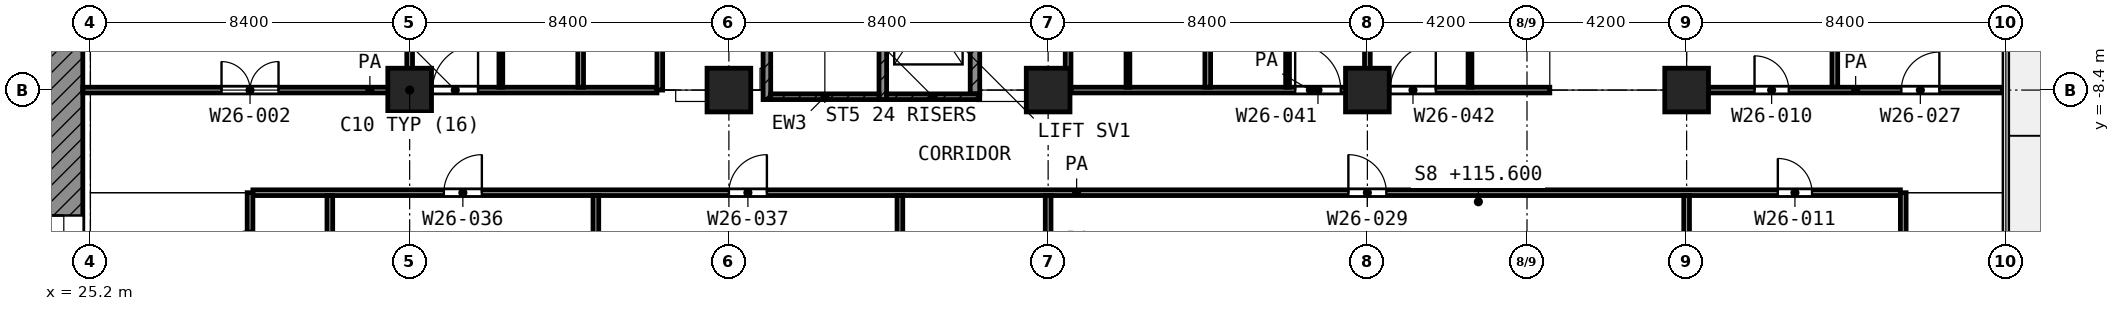
"""IFC4 building model, lengths in metres.
Left out: names, types, materials, properties, quantities, classifications, styles, units other than length and angle.
Written with IfcOpenShell. Run it as: python <this file> out.ifc"""

import sys

from ifc_helpers import new_model, si_unit, direction, frame, frame_2d, origin, origin_2d, place, context, subcontext, project, spatial, rectangle, extrude, element, fill, save


model = new_model("IFC4")
c1 = context("Model", 3, precision=1e-05, world=origin(), true_north=direction((0.0, 1.0)))
c2 = subcontext(c1, "Body", "Model", "MODEL_VIEW")
j1 = project(units=[si_unit("LENGTHUNIT", "METRE"), si_unit("PLANEANGLEUNIT", "RADIAN")], contexts=[c1])
p1 = place(None, origin())
s1 = spatial("IfcSite", under=j1, at=p1, CompositionType="ELEMENT")
p2 = place(p1, origin())
s2 = spatial("IfcBuilding", under=s1, at=p2, CompositionType="ELEMENT")
p3 = place(p2, frame((0.0, 0.0, 115.6)))
s3 = spatial("IfcBuildingStorey", under=s2, at=p3, CompositionType="ELEMENT", Elevation=115.6)
for number, where, z_axis, x_axis in (
    (1, (33.6, -8.4, 0.0), (0.0, 0.0, 1.0), (1.0, 0.0, 0.0)),
    (2, (42.0, -8.4, 0.0), (0.0, 0.0, 1.0), (1.0, 0.0, 0.0)),
    (3, (50.4, -8.4, 0.0), (0.0, 0.0, 1.0), (1.0, 0.0, 0.0)),
    (4, (58.8, -8.4, 0.0), (0.0, 0.0, 1.0), (1.0, 0.0, 0.0)),
    (5, (67.2, -8.4, 0.0), (0.0, 0.0, 1.0), (1.0, 0.0, 0.0)),
):
    element("IfcColumn", number, at=place(p3, frame(where, z_axis=z_axis, x_axis=x_axis)), inside=s3, PredefinedType="COLUMN", context=c2, shape_type="SweptSolid", body=[
        extrude(rectangle(XDim=1.15, YDim=1.15, at=origin_2d()), origin(), (0.0, 0.0, 1.0), 4.2),
    ])
p4 = place(p3, frame((24.5, -24.0, 0.0), z_axis=(0.0, 0.0, 1.0), x_axis=(0.0, 1.0, 0.0)))
e6 = element("IfcWall", 6, at=p4, inside=s3, PredefinedType="SHEAR", context=c2, shape_type="SweptSolid", body=[
    extrude(rectangle(XDim=18.6, YDim=1.0, at=frame_2d((9.3, 0.0))), origin(), (0.0, 0.0, 1.0), 3.6),
])
p5 = place(p4, frame((10.5, 0.0, 0.0)))
e7 = element("IfcOpeningElement", 7, at=p5, cuts=e6, PredefinedType="OPENING", context=c2, shape_type="SweptSolid", body=[
    extrude(rectangle(XDim=1.8, YDim=2.1, at=frame_2d((0.9, 1.05))), frame((0.0, 0.51, 0.0), z_axis=(0.0, -1.0, 0.0), x_axis=(1.0, 0.0, 0.0)), (0.0, 0.0, 1.0), 1.02),
])
p6 = place(p3, frame((43.0, -8.65, 0.0), z_axis=(0.0, 0.0, 1.0), x_axis=(0.0, 1.0, 0.0)))
e8 = element("IfcWall", 8, at=p6, inside=s3, PredefinedType="SHEAR", context=c2, shape_type="SweptSolid", body=[
    extrude(rectangle(XDim=8.35, YDim=0.2, at=frame_2d((4.175, 0.0))), origin(), (0.0, 0.0, 1.0), 3.6),
])
p7 = place(p6, frame((7.0, 0.0, 0.0)))
e9 = element("IfcOpeningElement", 9, at=p7, cuts=e8, PredefinedType="OPENING", context=c2, shape_type="SweptSolid", body=[
    extrude(rectangle(XDim=1.1, YDim=2.1, at=frame_2d((0.55, 1.05))), frame((0.0, 0.11, 0.0), z_axis=(0.0, -1.0, 0.0), x_axis=(1.0, 0.0, 0.0)), (0.0, 0.0, 1.0), 0.22),
])
p8 = place(p3, frame((46.05, -8.65, 0.0), z_axis=(0.0, 0.0, 1.0), x_axis=(0.0, 1.0, 0.0)))
e10 = element("IfcWall", 10, at=p8, inside=s3, PredefinedType="SHEAR", context=c2, shape_type="SweptSolid", body=[
    extrude(rectangle(XDim=8.35, YDim=0.2, at=frame_2d((4.175, 0.0))), origin(), (0.0, 0.0, 1.0), 3.6),
])
p9 = place(p8, frame((7.0, 0.0, 0.0)))
e11 = element("IfcOpeningElement", 11, at=p9, cuts=e10, PredefinedType="OPENING", context=c2, shape_type="SweptSolid", body=[
    extrude(rectangle(XDim=1.1, YDim=2.1, at=frame_2d((0.55, 1.05))), frame((0.0, 0.11, 0.0), z_axis=(0.0, -1.0, 0.0), x_axis=(1.0, 0.0, 0.0)), (0.0, 0.0, 1.0), 0.22),
])
p10 = place(p3, frame((43.1, -8.575, 0.0), z_axis=(0.0, 0.0, 1.0), x_axis=(1.0, 0.0, 0.0)))
e12 = element("IfcWall", 12, at=p10, inside=s3, PredefinedType="SHEAR", context=c2, shape_type="SweptSolid", body=[
    extrude(rectangle(XDim=2.85, YDim=0.15, at=frame_2d((1.425, 0.0))), origin(), (0.0, 0.0, 1.0), 3.6),
])
p11 = place(p3, frame((46.15, -8.575, 0.0), z_axis=(0.0, 0.0, 1.0), x_axis=(1.0, 0.0, 0.0)))
e13 = element("IfcWall", 13, at=p11, inside=s3, PredefinedType="SHEAR", context=c2, shape_type="SweptSolid", body=[
    extrude(rectangle(XDim=2.45, YDim=0.15, at=frame_2d((1.225, 0.0))), origin(), (0.0, 0.0, 1.0), 3.6),
])
p12 = place(p3, frame((48.475, -8.5, 0.0), z_axis=(0.0, 0.0, 1.0), x_axis=(0.0, 1.0, 0.0)))
e14 = element("IfcWall", 14, at=p12, inside=s3, PredefinedType="SHEAR", context=c2, shape_type="SweptSolid", body=[
    extrude(rectangle(XDim=3.475, YDim=0.25, at=frame_2d((1.738, 0.0))), origin(), (0.0, 0.0, 1.0), 3.6),
])
p13 = place(p3, frame((36.0, -8.325, 0.0), z_axis=(0.0, 0.0, 1.0), x_axis=(0.0, 1.0, 0.0)))
e15 = element("IfcWall", 15, at=p13, inside=s3, PredefinedType="PARTITIONING", context=c2, shape_type="SweptSolid", body=[
    extrude(rectangle(XDim=2.624, YDim=0.1, at=frame_2d((1.312, 0.0))), origin(), (0.0, 0.0, 1.0), 3.6),
])
for number, where, z_axis, x_axis in (
    (16, (52.5, -8.325, 0.0), (0.0, 0.0, 1.0), (0.0, 1.0, 0.0)),
    (17, (56.7, -8.325, 0.0), (0.0, 0.0, 1.0), (0.0, 1.0, 0.0)),
    (18, (61.5, -8.325, 0.0), (0.0, 0.0, 1.0), (0.0, 1.0, 0.0)),
):
    element("IfcWall", number, at=place(p3, frame(where, z_axis=z_axis, x_axis=x_axis)), inside=s3, PredefinedType="PARTITIONING", context=c2, shape_type="SweptSolid", body=[
        extrude(rectangle(XDim=2.625, YDim=0.1, at=frame_2d((1.312, 0.0))), origin(), (0.0, 0.0, 1.0), 3.6),
    ])
p14 = place(p3, frame((29.475, -11.1, 0.0), z_axis=(0.0, 0.0, 1.0), x_axis=(1.0, 0.0, 0.0)))
e19 = element("IfcWall", 19, at=p14, inside=s3, PredefinedType="PARTITIONING", context=c2, shape_type="SweptSolid", body=[
    extrude(rectangle(XDim=43.35, YDim=0.15, at=frame_2d((21.675, 0.0))), origin(), (0.0, 0.0, 1.0), 3.6),
])
p15 = place(p14, frame((28.825, 0.0, 0.0)))
e20 = element("IfcOpeningElement", 20, at=p15, cuts=e19, PredefinedType="OPENING", context=c2, shape_type="SweptSolid", body=[
    extrude(rectangle(XDim=1.0, YDim=2.1, at=frame_2d((0.5, 1.05))), frame((0.0, 0.085, 0.0), z_axis=(0.0, -1.0, 0.0), x_axis=(1.0, 0.0, 0.0)), (0.0, 0.0, 1.0), 0.17),
])
p16 = place(p14, frame((40.125, 0.0, 0.0)))
e21 = element("IfcOpeningElement", 21, at=p16, cuts=e19, PredefinedType="OPENING", context=c2, shape_type="SweptSolid", body=[
    extrude(rectangle(XDim=0.9, YDim=2.1, at=frame_2d((0.45, 1.05))), frame((0.0, 0.085, 0.0), z_axis=(0.0, -1.0, 0.0), x_axis=(1.0, 0.0, 0.0)), (0.0, 0.0, 1.0), 0.17),
])
p17 = place(p14, frame((5.025, 0.0, 0.0)))
e22 = element("IfcOpeningElement", 22, at=p17, cuts=e19, PredefinedType="OPENING", context=c2, shape_type="SweptSolid", body=[
    extrude(rectangle(XDim=1.0, YDim=2.1, at=frame_2d((0.5, 1.05))), frame((0.0, 0.085, 0.0), z_axis=(0.0, -1.0, 0.0), x_axis=(1.0, 0.0, 0.0)), (0.0, 0.0, 1.0), 0.17),
])
p18 = place(p14, frame((12.525, 0.0, 0.0)))
e23 = element("IfcOpeningElement", 23, at=p18, cuts=e19, PredefinedType="OPENING", context=c2, shape_type="SweptSolid", body=[
    extrude(rectangle(XDim=1.0, YDim=2.1, at=frame_2d((0.5, 1.05))), frame((0.0, 0.085, 0.0), z_axis=(0.0, -1.0, 0.0), x_axis=(1.0, 0.0, 0.0)), (0.0, 0.0, 1.0), 0.17),
])
p19 = place(p3, frame((25.0, -8.4, 0.0), z_axis=(0.0, 0.0, 1.0), x_axis=(1.0, 0.0, 0.0)))
e24 = element("IfcWall", 24, at=p19, inside=s3, PredefinedType="PARTITIONING", context=c2, shape_type="SweptSolid", body=[
    extrude(rectangle(XDim=15.107, YDim=0.15, at=frame_2d((7.553, 0.0))), origin(), (0.0, 0.0, 1.0), 3.6),
])
p20 = place(p19, frame((3.65, 0.0, 0.0)))
e25 = element("IfcOpeningElement", 25, at=p20, cuts=e24, PredefinedType="OPENING", context=c2, shape_type="SweptSolid", body=[
    extrude(rectangle(XDim=1.5, YDim=2.1, at=frame_2d((0.75, 1.05))), frame((0.0, 0.085, 0.0), z_axis=(0.0, -1.0, 0.0), x_axis=(1.0, 0.0, 0.0)), (0.0, 0.0, 1.0), 0.17),
])
p21 = place(p19, frame((9.2, 0.0, 0.0)))
e26 = element("IfcOpeningElement", 26, at=p21, cuts=e24, PredefinedType="OPENING", context=c2, shape_type="SweptSolid", body=[
    extrude(rectangle(XDim=1.2, YDim=2.1, at=frame_2d((0.6, 1.05))), frame((0.0, 0.085, 0.0), z_axis=(0.0, -1.0, 0.0), x_axis=(1.0, 0.0, 0.0)), (0.0, 0.0, 1.0), 0.17),
])
p22 = place(p3, frame((51.0, -8.4, 0.0), z_axis=(0.0, 0.0, 1.0), x_axis=(1.0, 0.0, 0.0)))
e27 = element("IfcWall", 27, at=p22, inside=s3, PredefinedType="PARTITIONING", context=c2, shape_type="SweptSolid", body=[
    extrude(rectangle(XDim=12.6, YDim=0.15, at=frame_2d((6.3, 0.0))), origin(), (0.0, 0.0, 1.0), 3.6),
])
p23 = place(p22, frame((5.9, 0.0, 0.0)))
e28 = element("IfcOpeningElement", 28, at=p23, cuts=e27, PredefinedType="OPENING", context=c2, shape_type="SweptSolid", body=[
    extrude(rectangle(XDim=1.2, YDim=2.1, at=frame_2d((0.6, 1.05))), frame((0.0, 0.085, 0.0), z_axis=(0.0, -1.0, 0.0), x_axis=(1.0, 0.0, 0.0)), (0.0, 0.0, 1.0), 0.17),
])
p24 = place(p22, frame((8.4, 0.0, 0.0)))
e29 = element("IfcOpeningElement", 29, at=p24, cuts=e27, PredefinedType="OPENING", context=c2, shape_type="SweptSolid", body=[
    extrude(rectangle(XDim=1.2, YDim=2.1, at=frame_2d((0.6, 1.05))), frame((0.0, 0.085, 0.0), z_axis=(0.0, -1.0, 0.0), x_axis=(1.0, 0.0, 0.0)), (0.0, 0.0, 1.0), 0.17),
])
p25 = place(p3, frame((67.775, -8.4, 0.0), z_axis=(0.0, 0.0, 1.0), x_axis=(1.0, 0.0, 0.0)))
e30 = element("IfcWall", 30, at=p25, inside=s3, PredefinedType="PARTITIONING", context=c2, shape_type="SweptSolid", body=[
    extrude(rectangle(XDim=7.745, YDim=0.15, at=frame_2d((3.873, 0.0))), origin(), (0.0, 0.0, 1.0), 3.6),
])
p26 = place(p25, frame((1.212, 0.0, 0.0)))
e31 = element("IfcOpeningElement", 31, at=p26, cuts=e30, PredefinedType="OPENING", context=c2, shape_type="SweptSolid", body=[
    extrude(rectangle(XDim=0.9, YDim=2.1, at=frame_2d((0.45, 1.05))), frame((0.0, 0.085, 0.0), z_axis=(0.0, -1.0, 0.0), x_axis=(1.0, 0.0, 0.0)), (0.0, 0.0, 1.0), 0.17),
])
p27 = place(p25, frame((5.075, 0.0, 0.0)))
e32 = element("IfcOpeningElement", 32, at=p27, cuts=e30, PredefinedType="OPENING", context=c2, shape_type="SweptSolid", body=[
    extrude(rectangle(XDim=1.0, YDim=2.1, at=frame_2d((0.5, 1.05))), frame((0.0, 0.085, 0.0), z_axis=(0.0, -1.0, 0.0), x_axis=(1.0, 0.0, 0.0)), (0.0, 0.0, 1.0), 0.17),
])
p28 = place(p3, frame((29.4, -14.1, 0.0), z_axis=(0.0, 0.0, 1.0), x_axis=(0.0, 1.0, 0.0)))
e33 = element("IfcWall", 33, at=p28, inside=s3, PredefinedType="PARTITIONING", context=c2, shape_type="SweptSolid", body=[
    extrude(rectangle(XDim=3.0, YDim=0.15, at=frame_2d((1.5, 0.0))), origin(), (0.0, 0.0, 1.0), 3.6),
])
p29 = place(p28, frame((1.0, 0.0, 0.0)))
e34 = element("IfcOpeningElement", 34, at=p29, cuts=e33, PredefinedType="OPENING", context=c2, shape_type="SweptSolid", body=[
    extrude(rectangle(XDim=1.0, YDim=2.1, at=frame_2d((0.5, 1.05))), frame((0.0, 0.085, 0.0), z_axis=(0.0, -1.0, 0.0), x_axis=(1.0, 0.0, 0.0)), (0.0, 0.0, 1.0), 0.17),
])
p30 = place(p3, frame((31.5, -14.025, 0.0), z_axis=(0.0, 0.0, 1.0), x_axis=(0.0, 1.0, 0.0)))
e35 = element("IfcWall", 35, at=p30, inside=s3, PredefinedType="PARTITIONING", context=c2, shape_type="SweptSolid", body=[
    extrude(rectangle(XDim=2.85, YDim=0.15, at=frame_2d((1.425, 0.0))), origin(), (0.0, 0.0, 1.0), 3.6),
])
for number, where, z_axis, x_axis in (
    (36, (33.6, -8.325, 0.0), (0.0, 0.0, 1.0), (0.0, 1.0, 0.0)),
    (37, (38.1, -8.325, 0.0), (0.0, 0.0, 1.0), (0.0, 1.0, 0.0)),
):
    element("IfcWall", number, at=place(p3, frame(where, z_axis=z_axis, x_axis=x_axis)), inside=s3, PredefinedType="PARTITIONING", context=c2, shape_type="SweptSolid", body=[
        extrude(rectangle(XDim=8.322, YDim=0.15, at=frame_2d((4.161, 0.0))), origin(), (0.0, 0.0, 1.0), 3.6),
    ])
p31 = place(p3, frame((38.5, -14.025, 0.0), z_axis=(0.0, 0.0, 1.0), x_axis=(0.0, 1.0, 0.0)))
e38 = element("IfcWall", 38, at=p31, inside=s3, PredefinedType="PARTITIONING", context=c2, shape_type="SweptSolid", body=[
    extrude(rectangle(XDim=2.85, YDim=0.15, at=frame_2d((1.425, 0.0))), origin(), (0.0, 0.0, 1.0), 3.6),
])
p32 = place(p3, frame((40.182, -8.4, 0.0), z_axis=(0.0, 0.0, 1.0), x_axis=(0.0, 1.0, 0.0)))
e39 = element("IfcWall", 39, at=p32, inside=s3, PredefinedType="PARTITIONING", context=c2, shape_type="SweptSolid", body=[
    extrude(rectangle(XDim=8.05, YDim=0.15, at=frame_2d((4.025, 0.0))), origin(), (0.0, 0.0, 1.0), 3.6),
])
p33 = place(p32, frame((3.575, 0.0, 0.0)))
e40 = element("IfcOpeningElement", 40, at=p33, cuts=e39, PredefinedType="OPENING", context=c2, shape_type="SweptSolid", body=[
    extrude(rectangle(XDim=0.9, YDim=2.1, at=frame_2d((0.45, 1.05))), frame((0.0, 0.085, 0.0), z_axis=(0.0, -1.0, 0.0), x_axis=(1.0, 0.0, 0.0)), (0.0, 0.0, 1.0), 0.17),
])
for number, where, z_axis, x_axis in (
    (41, (46.5, -14.025, 0.0), (0.0, 0.0, 1.0), (0.0, 1.0, 0.0)),
    (42, (50.4, -14.025, 0.0), (0.0, 0.0, 1.0), (0.0, 1.0, 0.0)),
):
    element("IfcWall", number, at=place(p3, frame(where, z_axis=z_axis, x_axis=x_axis)), inside=s3, PredefinedType="PARTITIONING", context=c2, shape_type="SweptSolid", body=[
        extrude(rectangle(XDim=2.85, YDim=0.15, at=frame_2d((1.425, 0.0))), origin(), (0.0, 0.0, 1.0), 3.6),
    ])
p34 = place(p3, frame((50.925, -8.4, 0.0), z_axis=(0.0, 0.0, 1.0), x_axis=(0.0, 1.0, 0.0)))
e43 = element("IfcWall", 43, at=p34, inside=s3, PredefinedType="PARTITIONING", context=c2, shape_type="SweptSolid", body=[
    extrude(rectangle(XDim=6.548, YDim=0.15, at=frame_2d((3.274, 0.0))), origin(), (0.0, 0.0, 1.0), 3.6),
])
p35 = place(p34, frame((3.765, 0.0, 0.0)))
e44 = element("IfcOpeningElement", 44, at=p35, cuts=e43, PredefinedType="OPENING", context=c2, shape_type="SweptSolid", body=[
    extrude(rectangle(XDim=1.2, YDim=2.1, at=frame_2d((0.6, 1.05))), frame((0.0, 0.085, 0.0), z_axis=(0.0, -1.0, 0.0), x_axis=(1.0, 0.0, 0.0)), (0.0, 0.0, 1.0), 0.17),
])
p36 = place(p34, frame((1.583, 0.0, 0.0)))
e45 = element("IfcOpeningElement", 45, at=p36, cuts=e43, PredefinedType="OPENING", context=c2, shape_type="SweptSolid", body=[
    extrude(rectangle(XDim=1.2, YDim=2.1, at=frame_2d((0.6, 1.05))), frame((0.0, 0.085, 0.0), z_axis=(0.0, -1.0, 0.0), x_axis=(1.0, 0.0, 0.0)), (0.0, 0.0, 1.0), 0.17),
])
p37 = place(p3, frame((54.6, -8.325, 0.0), z_axis=(0.0, 0.0, 1.0), x_axis=(0.0, 1.0, 0.0)))
e46 = element("IfcWall", 46, at=p37, inside=s3, PredefinedType="PARTITIONING", context=c2, shape_type="SweptSolid", body=[
    extrude(rectangle(XDim=8.323, YDim=0.15, at=frame_2d((4.162, 0.0))), origin(), (0.0, 0.0, 1.0), 3.6),
])
p38 = place(p3, frame((58.8, -8.325, 0.0), z_axis=(0.0, 0.0, 1.0), x_axis=(0.0, 1.0, 0.0)))
e47 = element("IfcWall", 47, at=p38, inside=s3, PredefinedType="PARTITIONING", context=c2, shape_type="SweptSolid", body=[
    extrude(rectangle(XDim=8.325, YDim=0.15, at=frame_2d((4.163, 0.0))), origin(), (0.0, 0.0, 1.0), 3.6),
])
p39 = place(p3, frame((67.2, -14.025, 0.0), z_axis=(0.0, 0.0, 1.0), x_axis=(0.0, 1.0, 0.0)))
e48 = element("IfcWall", 48, at=p39, inside=s3, PredefinedType="PARTITIONING", context=c2, shape_type="SweptSolid", body=[
    extrude(rectangle(XDim=2.85, YDim=0.15, at=frame_2d((1.425, 0.0))), origin(), (0.0, 0.0, 1.0), 3.6),
])
p40 = place(p3, frame((71.1, -8.325, 0.0), z_axis=(0.0, 0.0, 1.0), x_axis=(0.0, 1.0, 0.0)))
e49 = element("IfcWall", 49, at=p40, inside=s3, PredefinedType="PARTITIONING", context=c2, shape_type="SweptSolid", body=[
    extrude(rectangle(XDim=8.325, YDim=0.15, at=frame_2d((4.163, 0.0))), origin(), (0.0, 0.0, 1.0), 3.6),
])
p41 = place(p3, frame((72.9, -14.1, 0.0), z_axis=(0.0, 0.0, 1.0), x_axis=(0.0, 1.0, 0.0)))
e50 = element("IfcWall", 50, at=p41, inside=s3, PredefinedType="PARTITIONING", context=c2, shape_type="SweptSolid", body=[
    extrude(rectangle(XDim=3.0, YDim=0.15, at=frame_2d((1.5, 0.0))), origin(), (0.0, 0.0, 1.0), 3.6),
])
p42 = place(p5, origin())
e51 = element("IfcDoor", 51, at=p42, inside=s3, OperationType="DOUBLE_DOOR_SINGLE_SWING", PredefinedType="DOOR", context=c2, shape_type="SweptSolid", body=[
    extrude(rectangle(XDim=1.8, YDim=2.1, at=frame_2d((0.9, 1.05))), frame((0.0, 0.025, 0.0), z_axis=(0.0, -1.0, 0.0), x_axis=(1.0, 0.0, 0.0)), (0.0, 0.0, 1.0), 0.05),
])
fill(e7, e51)
p43 = place(p20, origin())
e52 = element("IfcDoor", 52, at=p43, inside=s3, OperationType="DOUBLE_DOOR_SINGLE_SWING", PredefinedType="DOOR", context=c2, shape_type="SweptSolid", body=[
    extrude(rectangle(XDim=1.5, YDim=2.1, at=frame_2d((0.75, 1.05))), frame((0.0, 0.025, 0.0), z_axis=(0.0, -1.0, 0.0), x_axis=(1.0, 0.0, 0.0)), (0.0, 0.0, 1.0), 0.05),
])
fill(e25, e52)
p44 = place(p21, origin())
e53 = element("IfcDoor", 53, at=p44, inside=s3, OperationType="SINGLE_SWING_RIGHT", PredefinedType="DOOR", context=c2, shape_type="SweptSolid", body=[
    extrude(rectangle(XDim=1.2, YDim=2.1, at=frame_2d((0.6, 1.05))), frame((0.0, 0.025, 0.0), z_axis=(0.0, -1.0, 0.0), x_axis=(1.0, 0.0, 0.0)), (0.0, 0.0, 1.0), 0.05),
])
fill(e26, e53)
p45 = place(p23, origin())
e54 = element("IfcDoor", 54, at=p45, inside=s3, OperationType="SINGLE_SWING_LEFT", PredefinedType="DOOR", context=c2, shape_type="SweptSolid", body=[
    extrude(rectangle(XDim=1.2, YDim=2.1, at=frame_2d((0.6, 1.05))), frame((0.0, 0.025, 0.0), z_axis=(0.0, -1.0, 0.0), x_axis=(1.0, 0.0, 0.0)), (0.0, 0.0, 1.0), 0.05),
])
fill(e28, e54)
p46 = place(p24, origin())
e55 = element("IfcDoor", 55, at=p46, inside=s3, OperationType="SINGLE_SWING_RIGHT", PredefinedType="DOOR", context=c2, shape_type="SweptSolid", body=[
    extrude(rectangle(XDim=1.2, YDim=2.1, at=frame_2d((0.6, 1.05))), frame((0.0, 0.025, 0.0), z_axis=(0.0, -1.0, 0.0), x_axis=(1.0, 0.0, 0.0)), (0.0, 0.0, 1.0), 0.05),
])
fill(e29, e55)
p47 = place(p26, origin())
e56 = element("IfcDoor", 56, at=p47, inside=s3, OperationType="SINGLE_SWING_LEFT", PredefinedType="DOOR", context=c2, shape_type="SweptSolid", body=[
    extrude(rectangle(XDim=0.9, YDim=2.1, at=frame_2d((0.45, 1.05))), frame((0.0, 0.025, 0.0), z_axis=(0.0, -1.0, 0.0), x_axis=(1.0, 0.0, 0.0)), (0.0, 0.0, 1.0), 0.05),
])
fill(e31, e56)
p48 = place(p27, origin())
e57 = element("IfcDoor", 57, at=p48, inside=s3, OperationType="SINGLE_SWING_RIGHT", PredefinedType="DOOR", context=c2, shape_type="SweptSolid", body=[
    extrude(rectangle(XDim=1.0, YDim=2.1, at=frame_2d((0.5, 1.05))), frame((0.0, 0.025, 0.0), z_axis=(0.0, -1.0, 0.0), x_axis=(1.0, 0.0, 0.0)), (0.0, 0.0, 1.0), 0.05),
])
fill(e32, e57)
p49 = place(p15, origin())
e58 = element("IfcDoor", 58, at=p49, inside=s3, OperationType="SINGLE_SWING_LEFT", PredefinedType="DOOR", context=c2, shape_type="SweptSolid", body=[
    extrude(rectangle(XDim=1.0, YDim=2.1, at=frame_2d((0.5, 1.05))), frame((0.0, 0.025, 0.0), z_axis=(0.0, -1.0, 0.0), x_axis=(1.0, 0.0, 0.0)), (0.0, 0.0, 1.0), 0.05),
])
fill(e20, e58)
p50 = place(p16, origin())
e59 = element("IfcDoor", 59, at=p50, inside=s3, OperationType="SINGLE_SWING_LEFT", PredefinedType="DOOR", context=c2, shape_type="SweptSolid", body=[
    extrude(rectangle(XDim=0.9, YDim=2.1, at=frame_2d((0.45, 1.05))), frame((0.0, 0.025, 0.0), z_axis=(0.0, -1.0, 0.0), x_axis=(1.0, 0.0, 0.0)), (0.0, 0.0, 1.0), 0.05),
])
fill(e21, e59)
p51 = place(p17, origin())
e60 = element("IfcDoor", 60, at=p51, inside=s3, OperationType="SINGLE_SWING_RIGHT", PredefinedType="DOOR", context=c2, shape_type="SweptSolid", body=[
    extrude(rectangle(XDim=1.0, YDim=2.1, at=frame_2d((0.5, 1.05))), frame((0.0, 0.025, 0.0), z_axis=(0.0, -1.0, 0.0), x_axis=(1.0, 0.0, 0.0)), (0.0, 0.0, 1.0), 0.05),
])
fill(e22, e60)
p52 = place(p18, origin())
e61 = element("IfcDoor", 61, at=p52, inside=s3, OperationType="SINGLE_SWING_RIGHT", PredefinedType="DOOR", context=c2, shape_type="SweptSolid", body=[
    extrude(rectangle(XDim=1.0, YDim=2.1, at=frame_2d((0.5, 1.05))), frame((0.0, 0.025, 0.0), z_axis=(0.0, -1.0, 0.0), x_axis=(1.0, 0.0, 0.0)), (0.0, 0.0, 1.0), 0.05),
])
fill(e23, e61)
save(model, sys.argv[1])
